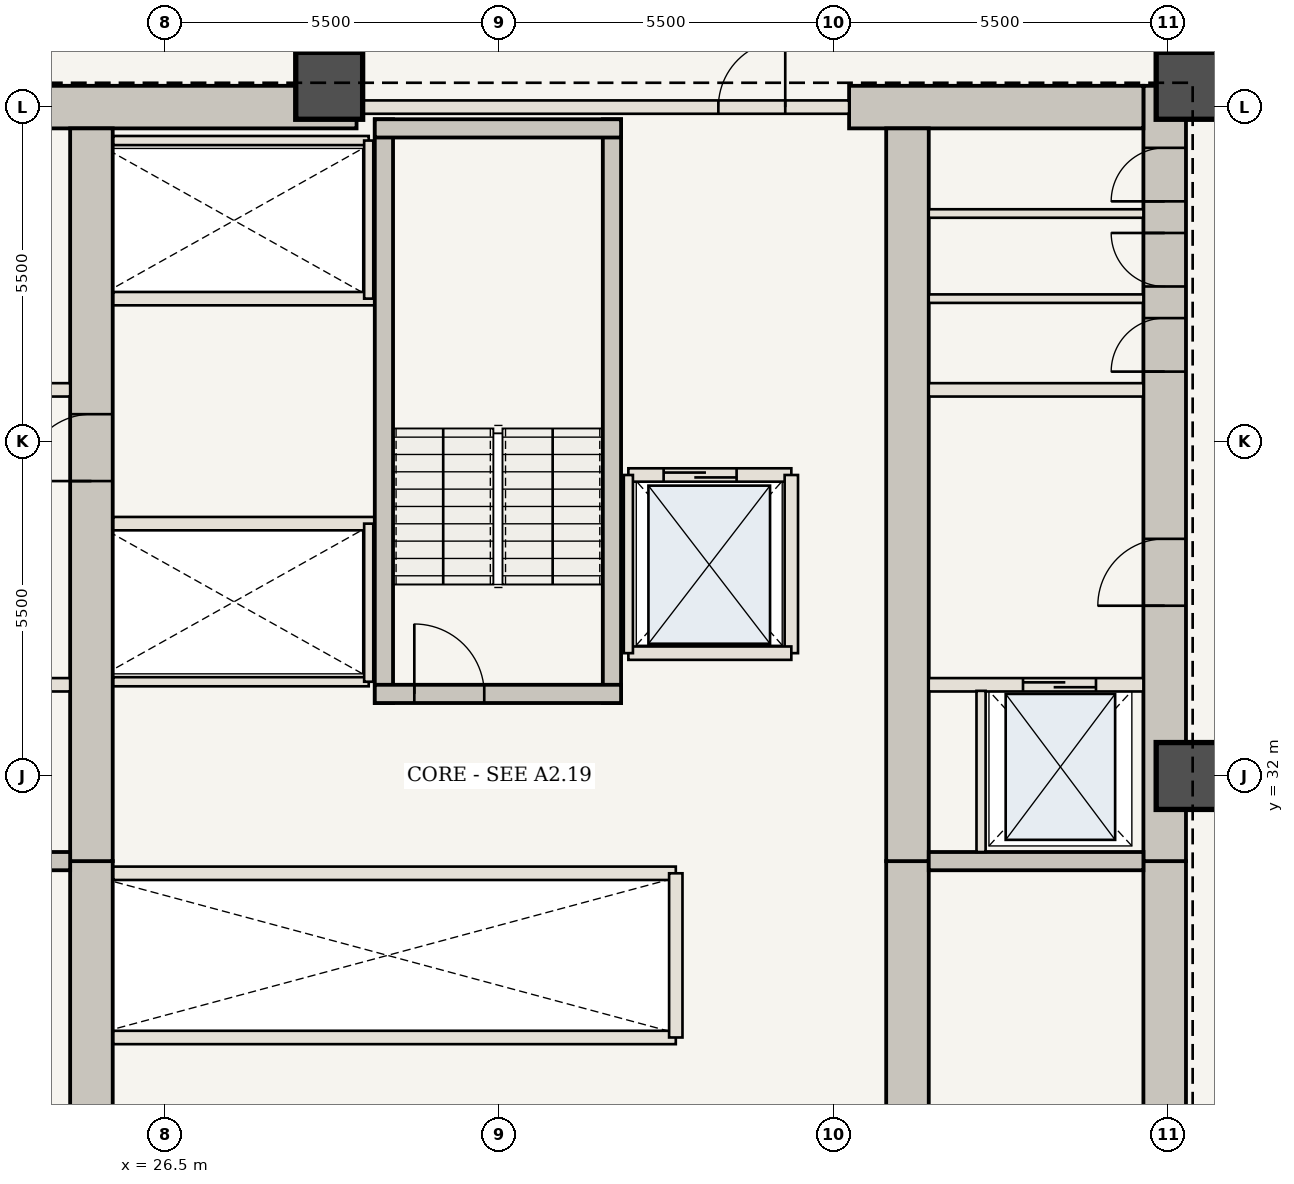
"""IFC4 building model, lengths in metres.
Left out: names, types, materials, properties, quantities, classifications, styles, units other than length and angle.
Written with IfcOpenShell. Run it as: python <this file> out.ifc"""

import sys

from ifc_helpers import new_model, si_unit, direction, frame, frame_2d, origin, origin_2d, place, context, subcontext, project, spatial, rectangle, extrude, element, fill, save


model = new_model("IFC4")
c1 = context("Model", 3, precision=1e-05, world=origin(), true_north=direction((0.0, 1.0)))
c2 = subcontext(c1, "Body", "Model", "MODEL_VIEW")
j1 = project(units=[si_unit("LENGTHUNIT", "METRE"), si_unit("PLANEANGLEUNIT", "RADIAN")], contexts=[c1])
p1 = place(None, origin())
s1 = spatial("IfcSite", under=j1, at=p1, CompositionType="ELEMENT")
p2 = place(p1, origin())
s2 = spatial("IfcBuilding", under=s1, at=p2, CompositionType="ELEMENT")
p3 = place(p2, frame((0.0, 0.0, 73.85)))
s3 = spatial("IfcBuildingStorey", under=s2, at=p3, CompositionType="ELEMENT", Elevation=73.85)
p4 = place(p3, frame((42.94, 20.6, 0.0), z_axis=(0.0, 0.0, 1.0), x_axis=(0.0, 1.0, 0.0)))
e1 = element("IfcWall", 1, at=p4, inside=s3, PredefinedType="SHEAR", context=c2, shape_type="SweptSolid", body=[
    extrude(rectangle(XDim=10.0, YDim=0.7, at=frame_2d((5.0, 0.0))), origin(), (0.0, 0.0, 1.0), 3.5),
])
p5 = place(p4, frame((1.15, 0.0, 0.0)))
e2 = element("IfcOpeningElement", 2, at=p5, cuts=e1, PredefinedType="OPENING", context=c2, shape_type="SweptSolid", body=[
    extrude(rectangle(XDim=1.15, YDim=2.15, at=frame_2d((0.575, 1.075))), frame((0.0, 0.36, 0.0), z_axis=(0.0, -1.0, 0.0), x_axis=(1.0, 0.0, 0.0)), (0.0, 0.0, 1.0), 0.72),
])
p6 = place(p3, frame((42.94, 30.6, 0.0), z_axis=(0.0, 0.0, 1.0), x_axis=(0.0, 1.0, 0.0)))
e3 = element("IfcWall", 3, at=p6, inside=s3, PredefinedType="SHEAR", context=c2, shape_type="SweptSolid", body=[
    extrude(rectangle(XDim=12.75, YDim=0.7, at=frame_2d((6.375, 0.0))), origin(), (0.0, 0.0, 1.0), 3.5),
])
p7 = place(p6, frame((4.2, 0.0, 0.0)))
e4 = element("IfcOpeningElement", 4, at=p7, cuts=e3, PredefinedType="OPENING", context=c2, shape_type="SweptSolid", body=[
    extrude(rectangle(XDim=1.1, YDim=2.15, at=frame_2d((0.55, 1.075))), frame((0.0, 0.36, 0.0), z_axis=(0.0, -1.0, 0.0), x_axis=(1.0, 0.0, 0.0)), (0.0, 0.0, 1.0), 0.72),
])
p8 = place(p6, frame((8.05, 0.0, 0.0)))
e5 = element("IfcOpeningElement", 5, at=p8, cuts=e3, PredefinedType="OPENING", context=c2, shape_type="SweptSolid", body=[
    extrude(rectangle(XDim=0.88, YDim=2.1, at=frame_2d((0.44, 1.05))), frame((0.0, 0.36, 0.0), z_axis=(0.0, -1.0, 0.0), x_axis=(1.0, 0.0, 0.0)), (0.0, 0.0, 1.0), 0.72),
])
p9 = place(p6, frame((9.45, 0.0, 0.0)))
e6 = element("IfcOpeningElement", 6, at=p9, cuts=e3, PredefinedType="OPENING", context=c2, shape_type="SweptSolid", body=[
    extrude(rectangle(XDim=0.88, YDim=2.1, at=frame_2d((0.44, 1.05))), frame((0.0, 0.36, 0.0), z_axis=(0.0, -1.0, 0.0), x_axis=(1.0, 0.0, 0.0)), (0.0, 0.0, 1.0), 0.72),
])
p10 = place(p6, frame((10.85, 0.0, 0.0)))
e7 = element("IfcOpeningElement", 7, at=p10, cuts=e3, PredefinedType="OPENING", context=c2, shape_type="SweptSolid", body=[
    extrude(rectangle(XDim=0.88, YDim=2.1, at=frame_2d((0.44, 1.05))), frame((0.0, 0.36, 0.0), z_axis=(0.0, -1.0, 0.0), x_axis=(1.0, 0.0, 0.0)), (0.0, 0.0, 1.0), 0.72),
])
p11 = place(p3, frame((21.41, 43.0, 0.0), z_axis=(0.0, 0.0, 1.0), x_axis=(1.0, 0.0, 0.0)))
e8 = element("IfcWall", 8, at=p11, inside=s3, PredefinedType="SHEAR", context=c2, shape_type="SweptSolid", body=[
    extrude(rectangle(XDim=8.24, YDim=0.7, at=frame_2d((4.12, 0.0))), origin(), (0.0, 0.0, 1.0), 3.5),
])
p12 = place(p3, frame((37.75, 43.0, 0.0), z_axis=(0.0, 0.0, 1.0), x_axis=(1.0, 0.0, 0.0)))
e9 = element("IfcWall", 9, at=p12, inside=s3, PredefinedType="SHEAR", context=c2, shape_type="SweptSolid", body=[
    extrude(rectangle(XDim=4.84, YDim=0.7, at=frame_2d((2.42, 0.0))), origin(), (0.0, 0.0, 1.0), 3.5),
])
p13 = place(p3, frame((25.29, 21.3, 0.0), z_axis=(0.0, 0.0, 1.0), x_axis=(0.0, 1.0, 0.0)))
e10 = element("IfcWall", 10, at=p13, inside=s3, PredefinedType="SHEAR", context=c2, shape_type="SweptSolid", body=[
    extrude(rectangle(XDim=9.3, YDim=0.7, at=frame_2d((4.65, 0.0))), origin(), (0.0, 0.0, 1.0), 3.5),
])
p14 = place(p3, frame((25.29, 30.6, 0.0), z_axis=(0.0, 0.0, 1.0), x_axis=(0.0, 1.0, 0.0)))
e11 = element("IfcWall", 11, at=p14, inside=s3, PredefinedType="SHEAR", context=c2, shape_type="SweptSolid", body=[
    extrude(rectangle(XDim=12.05, YDim=0.7, at=frame_2d((6.025, 0.0))), origin(), (0.0, 0.0, 1.0), 3.5),
])
p15 = place(p14, frame((6.25, 0.0, 0.0)))
e12 = element("IfcOpeningElement", 12, at=p15, cuts=e11, PredefinedType="OPENING", context=c2, shape_type="SweptSolid", body=[
    extrude(rectangle(XDim=1.1, YDim=2.15, at=frame_2d((0.55, 1.075))), frame((0.0, 0.36, 0.0), z_axis=(0.0, -1.0, 0.0), x_axis=(1.0, 0.0, 0.0)), (0.0, 0.0, 1.0), 0.72),
])
p16 = place(p3, frame((38.71, 21.3, 0.0), z_axis=(0.0, 0.0, 1.0), x_axis=(0.0, 1.0, 0.0)))
e13 = element("IfcWall", 13, at=p16, inside=s3, PredefinedType="SHEAR", context=c2, shape_type="SweptSolid", body=[
    extrude(rectangle(XDim=9.3, YDim=0.7, at=frame_2d((4.65, 0.0))), origin(), (0.0, 0.0, 1.0), 3.5),
])
p17 = place(p3, frame((38.71, 30.6, 0.0), z_axis=(0.0, 0.0, 1.0), x_axis=(0.0, 1.0, 0.0)))
e14 = element("IfcWall", 14, at=p17, inside=s3, PredefinedType="SHEAR", context=c2, shape_type="SweptSolid", body=[
    extrude(rectangle(XDim=12.05, YDim=0.7, at=frame_2d((6.025, 0.0))), origin(), (0.0, 0.0, 1.0), 3.5),
])
for number, where, z_axis, x_axis in (
    (15, (43.35, 32.0, 0.0), (0.0, 0.0, 1.0), (1.0, 0.0, 0.0)),
    (16, (43.35, 43.35, 0.0), (0.0, 0.0, 1.0), (1.0, 0.0, 0.0)),
    (17, (29.2, 43.35, 0.0), (0.0, 0.0, 1.0), (1.0, 0.0, 0.0)),
):
    element("IfcColumn", number, at=place(p3, frame(where, z_axis=z_axis, x_axis=x_axis)), inside=s3, PredefinedType="COLUMN", context=c2, shape_type="SweptSolid", body=[
        extrude(rectangle(XDim=1.1, YDim=1.1, at=origin_2d()), origin(), (0.0, 0.0, 1.0), 3.5),
    ])
for number, where, z_axis, x_axis in (
    (18, (21.41, 30.6, 0.0), (0.0, 0.0, 1.0), (1.0, 0.0, 0.0)),
    (19, (39.06, 30.6, 0.0), (0.0, 0.0, 1.0), (1.0, 0.0, 0.0)),
):
    element("IfcWall", number, at=place(p3, frame(where, z_axis=z_axis, x_axis=x_axis)), inside=s3, PredefinedType="SHEAR", context=c2, shape_type="SweptSolid", body=[
        extrude(rectangle(XDim=3.53, YDim=0.3, at=frame_2d((1.765, 0.0))), origin(), (0.0, 0.0, 1.0), 3.24),
    ])
p18 = place(p3, frame((21.41, 33.5, 0.0), z_axis=(0.0, 0.0, 1.0), x_axis=(1.0, 0.0, 0.0)))
e20 = element("IfcWall", 20, at=p18, inside=s3, PredefinedType="STANDARD", context=c2, shape_type="SweptSolid", body=[
    extrude(rectangle(XDim=3.53, YDim=0.22, at=frame_2d((1.765, 0.0))), origin(), (0.0, 0.0, 1.0), 3.24),
])
p19 = place(p18, frame((0.75, 0.0, 0.0)))
e21 = element("IfcOpeningElement", 21, at=p19, cuts=e20, PredefinedType="OPENING", context=c2, shape_type="SweptSolid", body=[
    extrude(rectangle(XDim=1.2, YDim=2.2, at=frame_2d((0.6, 1.1))), frame((0.0, 0.12, 0.0), z_axis=(0.0, -1.0, 0.0), x_axis=(1.0, 0.0, 0.0)), (0.0, 0.0, 1.0), 0.24),
])
p20 = place(p3, frame((39.06, 33.5, 0.0), z_axis=(0.0, 0.0, 1.0), x_axis=(1.0, 0.0, 0.0)))
e22 = element("IfcWall", 22, at=p20, inside=s3, PredefinedType="STANDARD", context=c2, shape_type="SweptSolid", body=[
    extrude(rectangle(XDim=3.53, YDim=0.22, at=frame_2d((1.765, 0.0))), origin(), (0.0, 0.0, 1.0), 3.24),
])
p21 = place(p20, frame((1.55, 0.0, 0.0)))
e23 = element("IfcOpeningElement", 23, at=p21, cuts=e22, PredefinedType="OPENING", context=c2, shape_type="SweptSolid", body=[
    extrude(rectangle(XDim=1.2, YDim=2.2, at=frame_2d((0.6, 1.1))), frame((0.0, 0.12, 0.0), z_axis=(0.0, -1.0, 0.0), x_axis=(1.0, 0.0, 0.0)), (0.0, 0.0, 1.0), 0.24),
])
p22 = place(p3, frame((39.92, 30.75, 0.0), z_axis=(0.0, 0.0, 1.0), x_axis=(0.0, 1.0, 0.0)))
e24 = element("IfcWall", 24, at=p22, inside=s3, PredefinedType="STANDARD", context=c2, shape_type="SweptSolid", body=[
    extrude(rectangle(XDim=2.65, YDim=0.15, at=frame_2d((1.325, 0.0))), origin(), (0.0, 0.0, 1.0), 3.24),
])
for number, where, z_axis, x_axis in (
    (25, (21.41, 38.35, 0.0), (0.0, 0.0, 1.0), (1.0, 0.0, 0.0)),
    (26, (39.06, 38.35, 0.0), (0.0, 0.0, 1.0), (1.0, 0.0, 0.0)),
):
    element("IfcWall", number, at=place(p3, frame(where, z_axis=z_axis, x_axis=x_axis)), inside=s3, PredefinedType="STANDARD", context=c2, shape_type="SweptSolid", body=[
        extrude(rectangle(XDim=3.53, YDim=0.22, at=frame_2d((1.765, 0.0))), origin(), (0.0, 0.0, 1.0), 3.24),
    ])
for number, where, z_axis, x_axis in (
    (27, (39.06, 39.85, 0.0), (0.0, 0.0, 1.0), (1.0, 0.0, 0.0)),
    (28, (39.06, 41.25, 0.0), (0.0, 0.0, 1.0), (1.0, 0.0, 0.0)),
):
    element("IfcWall", number, at=place(p3, frame(where, z_axis=z_axis, x_axis=x_axis)), inside=s3, PredefinedType="STANDARD", context=c2, shape_type="SweptSolid", body=[
        extrude(rectangle(XDim=3.53, YDim=0.14, at=frame_2d((1.765, 0.0))), origin(), (0.0, 0.0, 1.0), 3.24),
    ])
for number, where, z_axis, x_axis in (
    (29, (25.65, 27.7, 0.0), (0.0, 0.0, 1.0), (1.0, 0.0, 0.0)),
    (30, (25.65, 30.4, 0.0), (0.0, 0.0, 1.0), (1.0, 0.0, 0.0)),
):
    element("IfcWall", number, at=place(p3, frame(where, z_axis=z_axis, x_axis=x_axis)), inside=s3, PredefinedType="STANDARD", context=c2, shape_type="SweptSolid", body=[
        extrude(rectangle(XDim=9.25, YDim=0.22, at=frame_2d((4.625, 0.0))), origin(), (0.0, 0.0, 1.0), 3.24),
    ])
p23 = place(p3, frame((34.9, 27.7, 0.0), z_axis=(0.0, 0.0, 1.0), x_axis=(0.0, 1.0, 0.0)))
e31 = element("IfcWall", 31, at=p23, inside=s3, PredefinedType="STANDARD", context=c2, shape_type="SweptSolid", body=[
    extrude(rectangle(XDim=2.7, YDim=0.22, at=frame_2d((1.35, 0.0))), origin(), (0.0, 0.0, 1.0), 3.24),
])
p24 = place(p3, frame((25.65, 36.15, 0.0), z_axis=(0.0, 0.0, 1.0), x_axis=(1.0, 0.0, 0.0)))
e32 = element("IfcWall", 32, at=p24, inside=s3, PredefinedType="STANDARD", context=c2, shape_type="SweptSolid", body=[
    extrude(rectangle(XDim=4.3, YDim=0.22, at=frame_2d((2.15, 0.0))), origin(), (0.0, 0.0, 1.0), 3.24),
])
p25 = place(p3, frame((25.65, 33.55, 0.0), z_axis=(0.0, 0.0, 1.0), x_axis=(1.0, 0.0, 0.0)))
e33 = element("IfcWall", 33, at=p25, inside=s3, PredefinedType="STANDARD", context=c2, shape_type="SweptSolid", body=[
    extrude(rectangle(XDim=4.2, YDim=0.15, at=frame_2d((2.1, 0.0))), origin(), (0.0, 0.0, 1.0), 3.24),
])
p26 = place(p3, frame((29.85, 33.55, 0.0), z_axis=(0.0, 0.0, 1.0), x_axis=(0.0, 1.0, 0.0)))
e34 = element("IfcWall", 34, at=p26, inside=s3, PredefinedType="STANDARD", context=c2, shape_type="SweptSolid", body=[
    extrude(rectangle(XDim=2.6, YDim=0.15, at=frame_2d((1.3, 0.0))), origin(), (0.0, 0.0, 1.0), 3.24),
])
p27 = place(p3, frame((25.65, 39.85, 0.0), z_axis=(0.0, 0.0, 1.0), x_axis=(1.0, 0.0, 0.0)))
e35 = element("IfcWall", 35, at=p27, inside=s3, PredefinedType="STANDARD", context=c2, shape_type="SweptSolid", body=[
    extrude(rectangle(XDim=4.3, YDim=0.22, at=frame_2d((2.15, 0.0))), origin(), (0.0, 0.0, 1.0), 3.24),
])
p28 = place(p3, frame((25.65, 42.45, 0.0), z_axis=(0.0, 0.0, 1.0), x_axis=(1.0, 0.0, 0.0)))
e36 = element("IfcWall", 36, at=p28, inside=s3, PredefinedType="STANDARD", context=c2, shape_type="SweptSolid", body=[
    extrude(rectangle(XDim=4.2, YDim=0.15, at=frame_2d((2.1, 0.0))), origin(), (0.0, 0.0, 1.0), 3.24),
])
p29 = place(p3, frame((29.85, 39.85, 0.0), z_axis=(0.0, 0.0, 1.0), x_axis=(0.0, 1.0, 0.0)))
e37 = element("IfcWall", 37, at=p29, inside=s3, PredefinedType="STANDARD", context=c2, shape_type="SweptSolid", body=[
    extrude(rectangle(XDim=2.6, YDim=0.15, at=frame_2d((1.3, 0.0))), origin(), (0.0, 0.0, 1.0), 3.24),
])
for number, where, z_axis, x_axis in (
    (38, (30.1, 33.2, 0.0), (0.0, 0.0, 1.0), (0.0, 1.0, 0.0)),
    (39, (33.85, 33.2, 0.0), (0.0, 0.0, 1.0), (0.0, 1.0, 0.0)),
):
    element("IfcWall", number, at=place(p3, frame(where, z_axis=z_axis, x_axis=x_axis)), inside=s3, PredefinedType="SHEAR", context=c2, shape_type="SweptSolid", body=[
        extrude(rectangle(XDim=9.6, YDim=0.3, at=frame_2d((4.8, 0.0))), origin(), (0.0, 0.0, 1.0), 3.24),
    ])
p30 = place(p3, frame((29.95, 33.35, 0.0), z_axis=(0.0, 0.0, 1.0), x_axis=(1.0, 0.0, 0.0)))
e40 = element("IfcWall", 40, at=p30, inside=s3, PredefinedType="SHEAR", context=c2, shape_type="SweptSolid", body=[
    extrude(rectangle(XDim=4.05, YDim=0.3, at=frame_2d((2.025, 0.0))), origin(), (0.0, 0.0, 1.0), 3.24),
])
p31 = place(p30, frame((0.65, 0.0, 0.0)))
e41 = element("IfcOpeningElement", 41, at=p31, cuts=e40, PredefinedType="OPENING", context=c2, shape_type="SweptSolid", body=[
    extrude(rectangle(XDim=1.15, YDim=2.15, at=frame_2d((0.575, 1.075))), frame((0.0, 0.16, 0.0), z_axis=(0.0, -1.0, 0.0), x_axis=(1.0, 0.0, 0.0)), (0.0, 0.0, 1.0), 0.32),
])
p32 = place(p3, frame((29.95, 42.65, 0.0), z_axis=(0.0, 0.0, 1.0), x_axis=(1.0, 0.0, 0.0)))
e42 = element("IfcWall", 42, at=p32, inside=s3, PredefinedType="SHEAR", context=c2, shape_type="SweptSolid", body=[
    extrude(rectangle(XDim=4.05, YDim=0.3, at=frame_2d((2.025, 0.0))), origin(), (0.0, 0.0, 1.0), 3.24),
])
p33 = place(p3, frame((29.65, 43.0, 0.0), z_axis=(0.0, 0.0, 1.0), x_axis=(1.0, 0.0, 0.0)))
e43 = element("IfcWall", 43, at=p33, inside=s3, PredefinedType="STANDARD", context=c2, shape_type="SweptSolid", body=[
    extrude(rectangle(XDim=8.1, YDim=0.22, at=frame_2d((4.05, 0.0))), origin(), (0.0, 0.0, 1.0), 3.24),
])
p34 = place(p33, frame((5.95, 0.0, 0.0)))
e44 = element("IfcOpeningElement", 44, at=p34, cuts=e43, PredefinedType="OPENING", context=c2, shape_type="SweptSolid", body=[
    extrude(rectangle(XDim=1.1, YDim=2.15, at=frame_2d((0.55, 1.075))), frame((0.0, 0.12, 0.0), z_axis=(0.0, -1.0, 0.0), x_axis=(1.0, 0.0, 0.0)), (0.0, 0.0, 1.0), 0.24),
])
p35 = place(p3, frame((34.12, 36.95, 0.0), z_axis=(0.0, 0.0, 1.0), x_axis=(1.0, 0.0, 0.0)))
e45 = element("IfcWall", 45, at=p35, inside=s3, PredefinedType="STANDARD", context=c2, shape_type="SweptSolid", body=[
    extrude(rectangle(XDim=2.68, YDim=0.22, at=frame_2d((1.34, 0.0))), origin(), (0.0, 0.0, 1.0), 3.24),
])
p36 = place(p35, frame((0.58, 0.0, 0.0)))
e46 = element("IfcOpeningElement", 46, at=p36, cuts=e45, PredefinedType="OPENING", context=c2, shape_type="SweptSolid", body=[
    extrude(rectangle(XDim=1.2, YDim=2.2, at=frame_2d((0.6, 1.1))), frame((0.0, 0.12, 0.0), z_axis=(0.0, -1.0, 0.0), x_axis=(1.0, 0.0, 0.0)), (0.0, 0.0, 1.0), 0.24),
])
p37 = place(p3, frame((36.8, 34.02, 0.0), z_axis=(0.0, 0.0, 1.0), x_axis=(0.0, 1.0, 0.0)))
e47 = element("IfcWall", 47, at=p37, inside=s3, PredefinedType="STANDARD", context=c2, shape_type="SweptSolid", body=[
    extrude(rectangle(XDim=2.93, YDim=0.22, at=frame_2d((1.465, 0.0))), origin(), (0.0, 0.0, 1.0), 3.24),
])
p38 = place(p3, frame((34.12, 34.02, 0.0), z_axis=(0.0, 0.0, 1.0), x_axis=(1.0, 0.0, 0.0)))
e48 = element("IfcWall", 48, at=p38, inside=s3, PredefinedType="STANDARD", context=c2, shape_type="SweptSolid", body=[
    extrude(rectangle(XDim=2.68, YDim=0.22, at=frame_2d((1.34, 0.0))), origin(), (0.0, 0.0, 1.0), 3.24),
])
p39 = place(p3, frame((34.12, 34.02, 0.0), z_axis=(0.0, 0.0, 1.0), x_axis=(0.0, 1.0, 0.0)))
e49 = element("IfcWall", 49, at=p39, inside=s3, PredefinedType="STANDARD", context=c2, shape_type="SweptSolid", body=[
    extrude(rectangle(XDim=2.93, YDim=0.15, at=frame_2d((1.465, 0.0))), origin(), (0.0, 0.0, 1.0), 3.24),
])
p40 = place(p7, origin())
e50 = element("IfcDoor", 50, at=p40, inside=s3, OperationType="SINGLE_SWING_LEFT", PredefinedType="DOOR", context=c2, shape_type="SweptSolid", body=[
    extrude(rectangle(XDim=1.1, YDim=2.15, at=frame_2d((0.55, 1.075))), frame((0.0, 0.025, 0.0), z_axis=(0.0, -1.0, 0.0), x_axis=(1.0, 0.0, 0.0)), (0.0, 0.0, 1.0), 0.05),
])
fill(e4, e50)
p41 = place(p15, origin())
e51 = element("IfcDoor", 51, at=p41, inside=s3, OperationType="SINGLE_SWING_LEFT", PredefinedType="DOOR", context=c2, shape_type="SweptSolid", body=[
    extrude(rectangle(XDim=1.1, YDim=2.15, at=frame_2d((0.55, 1.075))), frame((0.0, 0.025, 0.0), z_axis=(0.0, -1.0, 0.0), x_axis=(1.0, 0.0, 0.0)), (0.0, 0.0, 1.0), 0.05),
])
fill(e12, e51)
p42 = place(p8, origin())
e52 = element("IfcDoor", 52, at=p42, inside=s3, OperationType="SINGLE_SWING_LEFT", PredefinedType="DOOR", context=c2, shape_type="SweptSolid", body=[
    extrude(rectangle(XDim=0.88, YDim=2.1, at=frame_2d((0.44, 1.05))), frame((0.0, 0.025, 0.0), z_axis=(0.0, -1.0, 0.0), x_axis=(1.0, 0.0, 0.0)), (0.0, 0.0, 1.0), 0.05),
])
fill(e5, e52)
p43 = place(p9, origin())
e53 = element("IfcDoor", 53, at=p43, inside=s3, OperationType="SINGLE_SWING_RIGHT", PredefinedType="DOOR", context=c2, shape_type="SweptSolid", body=[
    extrude(rectangle(XDim=0.88, YDim=2.1, at=frame_2d((0.44, 1.05))), frame((0.0, 0.025, 0.0), z_axis=(0.0, -1.0, 0.0), x_axis=(1.0, 0.0, 0.0)), (0.0, 0.0, 1.0), 0.05),
])
fill(e6, e53)
p44 = place(p10, origin())
e54 = element("IfcDoor", 54, at=p44, inside=s3, OperationType="SINGLE_SWING_LEFT", PredefinedType="DOOR", context=c2, shape_type="SweptSolid", body=[
    extrude(rectangle(XDim=0.88, YDim=2.1, at=frame_2d((0.44, 1.05))), frame((0.0, 0.025, 0.0), z_axis=(0.0, -1.0, 0.0), x_axis=(1.0, 0.0, 0.0)), (0.0, 0.0, 1.0), 0.05),
])
fill(e7, e54)
p45 = place(p21, origin())
e55 = element("IfcDoor", 55, at=p45, inside=s3, OperationType="DOUBLE_DOOR_SLIDING", PredefinedType="DOOR", context=c2, shape_type="SweptSolid", body=[
    extrude(rectangle(XDim=1.2, YDim=2.2, at=frame_2d((0.6, 1.1))), frame((0.0, 0.025, 0.0), z_axis=(0.0, -1.0, 0.0), x_axis=(1.0, 0.0, 0.0)), (0.0, 0.0, 1.0), 0.05),
])
fill(e23, e55)
p46 = place(p31, origin())
e56 = element("IfcDoor", 56, at=p46, inside=s3, OperationType="SINGLE_SWING_LEFT", PredefinedType="DOOR", context=c2, shape_type="SweptSolid", body=[
    extrude(rectangle(XDim=1.15, YDim=2.15, at=frame_2d((0.575, 1.075))), frame((0.0, 0.025, 0.0), z_axis=(0.0, -1.0, 0.0), x_axis=(1.0, 0.0, 0.0)), (0.0, 0.0, 1.0), 0.05),
])
fill(e41, e56)
p47 = place(p34, origin())
e57 = element("IfcDoor", 57, at=p47, inside=s3, OperationType="SINGLE_SWING_RIGHT", PredefinedType="DOOR", context=c2, shape_type="SweptSolid", body=[
    extrude(rectangle(XDim=1.1, YDim=2.15, at=frame_2d((0.55, 1.075))), frame((0.0, 0.025, 0.0), z_axis=(0.0, -1.0, 0.0), x_axis=(1.0, 0.0, 0.0)), (0.0, 0.0, 1.0), 0.05),
])
fill(e44, e57)
p48 = place(p36, origin())
e58 = element("IfcDoor", 58, at=p48, inside=s3, OperationType="DOUBLE_DOOR_SLIDING", PredefinedType="DOOR", context=c2, shape_type="SweptSolid", body=[
    extrude(rectangle(XDim=1.2, YDim=2.2, at=frame_2d((0.6, 1.1))), frame((0.0, 0.025, 0.0), z_axis=(0.0, -1.0, 0.0), x_axis=(1.0, 0.0, 0.0)), (0.0, 0.0, 1.0), 0.05),
])
fill(e46, e58)
save(model, sys.argv[1])
